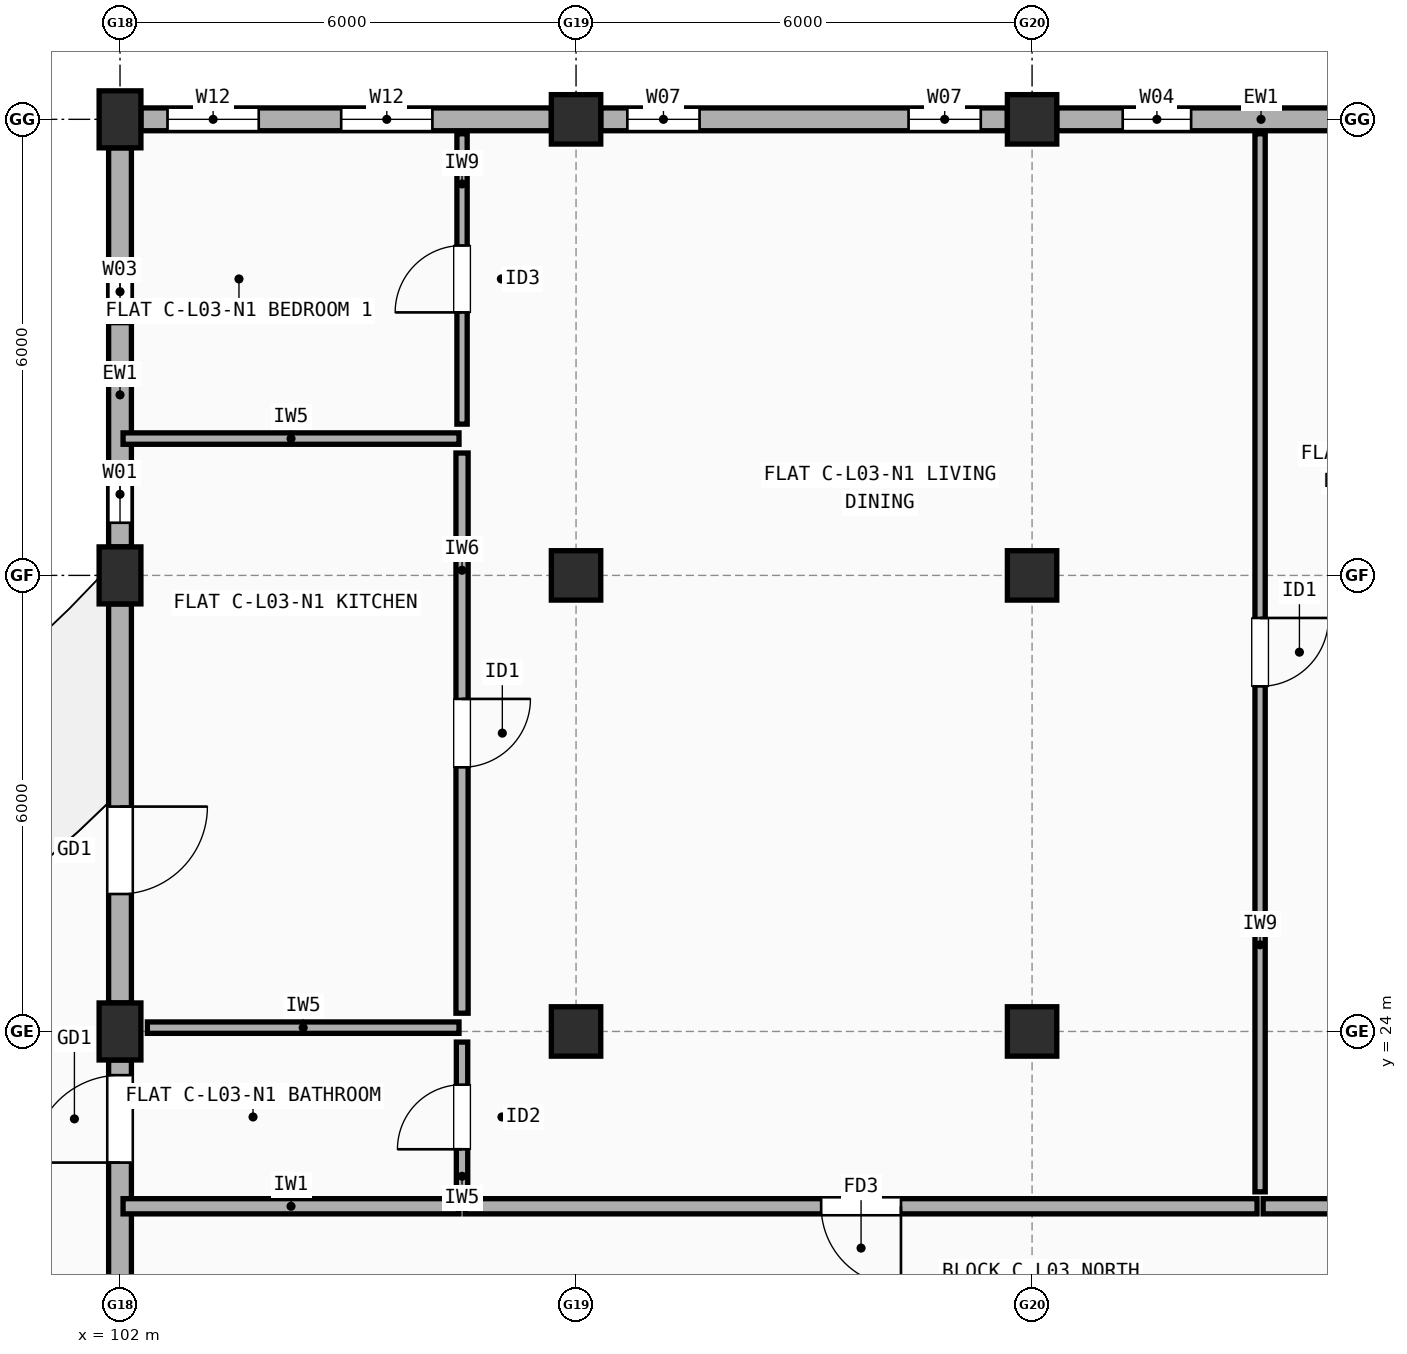
"""IFC4 building model, lengths in metres.
Left out: names, types, materials, properties, quantities, classifications, styles, units other than length and angle.
Written with IfcOpenShell. Run it as: python <this file> out.ifc"""

import sys

from ifc_helpers import new_model, si_unit, direction, frame, frame_2d, origin, origin_2d, place, context, subcontext, project, spatial, rectangle, extrude, element, fill, save


model = new_model("IFC4")
c1 = context("Model", 3, precision=1e-05, world=origin(), true_north=direction((0.0, 1.0)))
c2 = subcontext(c1, "Body", "Model", "MODEL_VIEW")
j1 = project(units=[si_unit("LENGTHUNIT", "METRE"), si_unit("PLANEANGLEUNIT", "RADIAN")], contexts=[c1])
p1 = place(None, origin())
s1 = spatial("IfcSite", under=j1, at=p1, CompositionType="ELEMENT")
p2 = place(p1, origin())
s2 = spatial("IfcBuilding", under=s1, at=p2, CompositionType="ELEMENT")
p3 = place(p2, frame((0.0, 0.0, 10.9)))
s3 = spatial("IfcBuildingStorey", under=s2, at=p3, CompositionType="ELEMENT", Elevation=10.9)
for number, where, z_axis, x_axis in (
    (1, (102.0, 24.0, 0.0), (0.0, 0.0, 1.0), (1.0, 0.0, 0.0)),
    (2, (102.0, 30.0, 0.0), (0.0, 0.0, 1.0), (1.0, 0.0, 0.0)),
    (3, (102.0, 36.0, 0.0), (0.0, 0.0, 1.0), (1.0, 0.0, 0.0)),
):
    element("IfcColumn", number, at=place(p3, frame(where, z_axis=z_axis, x_axis=x_axis)), inside=s3, PredefinedType="COLUMN", context=c2, shape_type="SweptSolid", body=[
        extrude(rectangle(XDim=0.55, YDim=0.75, at=origin_2d()), origin(), (0.0, 0.0, 1.0), 2.96),
    ])
for number, where, z_axis, x_axis in (
    (4, (108.0, 24.0, 0.0), (0.0, 0.0, 1.0), (1.0, 0.0, 0.0)),
    (5, (108.0, 30.0, 0.0), (0.0, 0.0, 1.0), (1.0, 0.0, 0.0)),
    (6, (108.0, 36.0, 0.0), (0.0, 0.0, 1.0), (1.0, 0.0, 0.0)),
    (7, (114.0, 24.0, 0.0), (0.0, 0.0, 1.0), (1.0, 0.0, 0.0)),
    (8, (114.0, 30.0, 0.0), (0.0, 0.0, 1.0), (1.0, 0.0, 0.0)),
    (9, (114.0, 36.0, 0.0), (0.0, 0.0, 1.0), (1.0, 0.0, 0.0)),
):
    element("IfcColumn", number, at=place(p3, frame(where, z_axis=z_axis, x_axis=x_axis)), inside=s3, PredefinedType="COLUMN", context=c2, shape_type="SweptSolid", body=[
        extrude(rectangle(XDim=0.65, YDim=0.65, at=origin_2d()), origin(), (0.0, 0.0, 1.0), 2.96),
    ])
p4 = place(p3, frame((119.675, 36.0, 0.0), z_axis=(0.0, 0.0, 1.0), x_axis=(-1.0, 0.0, 0.0)))
e10 = element("IfcWall", 10, at=p4, inside=s3, PredefinedType="STANDARD", context=c2, shape_type="SweptSolid", body=[
    extrude(rectangle(XDim=5.35, YDim=0.3, at=frame_2d((2.675, 0.0))), origin(), (0.0, 0.0, 1.0), 2.442),
])
p5 = place(p4, frame((0.893, 0.0, 0.9)))
e11 = element("IfcOpeningElement", 11, at=p5, cuts=e10, PredefinedType="OPENING", context=c2, shape_type="SweptSolid", body=[
    extrude(rectangle(XDim=0.85, YDim=1.25, at=frame_2d((0.425, 0.625))), frame((0.0, 0.16, 0.0), z_axis=(0.0, -1.0, 0.0), x_axis=(1.0, 0.0, 0.0)), (0.0, 0.0, 1.0), 0.32),
])
p6 = place(p4, frame((3.583, 0.0, 0.9)))
e12 = element("IfcOpeningElement", 12, at=p6, cuts=e10, PredefinedType="OPENING", context=c2, shape_type="SweptSolid", body=[
    extrude(rectangle(XDim=0.9, YDim=1.3, at=frame_2d((0.45, 0.65))), frame((0.0, 0.16, 0.0), z_axis=(0.0, -1.0, 0.0), x_axis=(1.0, 0.0, 0.0)), (0.0, 0.0, 1.0), 0.32),
])
p7 = place(p3, frame((113.675, 36.0, 0.0), z_axis=(0.0, 0.0, 1.0), x_axis=(-1.0, 0.0, 0.0)))
e13 = element("IfcWall", 13, at=p7, inside=s3, PredefinedType="STANDARD", context=c2, shape_type="SweptSolid", body=[
    extrude(rectangle(XDim=5.35, YDim=0.3, at=frame_2d((2.675, 0.0))), origin(), (0.0, 0.0, 1.0), 2.442),
])
p8 = place(p7, frame((0.35, 0.0, 0.9)))
e14 = element("IfcOpeningElement", 14, at=p8, cuts=e13, PredefinedType="OPENING", context=c2, shape_type="SweptSolid", body=[
    extrude(rectangle(XDim=0.95, YDim=1.35, at=frame_2d((0.475, 0.675))), frame((0.0, 0.16, 0.0), z_axis=(0.0, -1.0, 0.0), x_axis=(1.0, 0.0, 0.0)), (0.0, 0.0, 1.0), 0.32),
])
p9 = place(p7, frame((4.05, 0.0, 0.9)))
e15 = element("IfcOpeningElement", 15, at=p9, cuts=e13, PredefinedType="OPENING", context=c2, shape_type="SweptSolid", body=[
    extrude(rectangle(XDim=0.95, YDim=1.35, at=frame_2d((0.475, 0.675))), frame((0.0, 0.16, 0.0), z_axis=(0.0, -1.0, 0.0), x_axis=(1.0, 0.0, 0.0)), (0.0, 0.0, 1.0), 0.32),
])
p10 = place(p3, frame((107.675, 36.0, 0.0), z_axis=(0.0, 0.0, 1.0), x_axis=(-1.0, 0.0, 0.0)))
e16 = element("IfcWall", 16, at=p10, inside=s3, PredefinedType="STANDARD", context=c2, shape_type="SweptSolid", body=[
    extrude(rectangle(XDim=5.4, YDim=0.3, at=frame_2d((2.7, 0.0))), origin(), (0.0, 0.0, 1.0), 2.442),
])
p11 = place(p10, frame((1.565, 0.0, 0.9)))
e17 = element("IfcOpeningElement", 17, at=p11, cuts=e16, PredefinedType="OPENING", context=c2, shape_type="SweptSolid", body=[
    extrude(rectangle(XDim=1.2, YDim=1.35, at=frame_2d((0.6, 0.675))), frame((0.0, 0.16, 0.0), z_axis=(0.0, -1.0, 0.0), x_axis=(1.0, 0.0, 0.0)), (0.0, 0.0, 1.0), 0.32),
])
p12 = place(p10, frame((3.85, 0.0, 0.9)))
e18 = element("IfcOpeningElement", 18, at=p12, cuts=e16, PredefinedType="OPENING", context=c2, shape_type="SweptSolid", body=[
    extrude(rectangle(XDim=1.2, YDim=1.35, at=frame_2d((0.6, 0.675))), frame((0.0, 0.16, 0.0), z_axis=(0.0, -1.0, 0.0), x_axis=(1.0, 0.0, 0.0)), (0.0, 0.0, 1.0), 0.32),
])
p13 = place(p3, frame((102.0, 35.625, 0.0), z_axis=(0.0, 0.0, 1.0), x_axis=(0.0, -1.0, 0.0)))
e19 = element("IfcWall", 19, at=p13, inside=s3, PredefinedType="STANDARD", context=c2, shape_type="SweptSolid", body=[
    extrude(rectangle(XDim=5.25, YDim=0.3, at=frame_2d((2.625, 0.0))), origin(), (0.0, 0.0, 1.0), 2.442),
])
p14 = place(p13, frame((1.468, 0.0, 0.9)))
e20 = element("IfcOpeningElement", 20, at=p14, cuts=e19, PredefinedType="OPENING", context=c2, shape_type="SweptSolid", body=[
    extrude(rectangle(XDim=0.85, YDim=1.25, at=frame_2d((0.425, 0.625))), frame((0.0, 0.16, 0.0), z_axis=(0.0, -1.0, 0.0), x_axis=(1.0, 0.0, 0.0)), (0.0, 0.0, 1.0), 0.32),
])
p15 = place(p13, frame((4.183, 0.0, 0.9)))
e21 = element("IfcOpeningElement", 21, at=p15, cuts=e19, PredefinedType="OPENING", context=c2, shape_type="SweptSolid", body=[
    extrude(rectangle(XDim=0.75, YDim=1.15, at=frame_2d((0.375, 0.575))), frame((0.0, 0.16, 0.0), z_axis=(0.0, -1.0, 0.0), x_axis=(1.0, 0.0, 0.0)), (0.0, 0.0, 1.0), 0.32),
])
p16 = place(p3, frame((102.0, 29.625, 0.0), z_axis=(0.0, 0.0, 1.0), x_axis=(0.0, -1.0, 0.0)))
e22 = element("IfcWall", 22, at=p16, inside=s3, PredefinedType="STANDARD", context=c2, shape_type="SweptSolid", body=[
    extrude(rectangle(XDim=5.25, YDim=0.3, at=frame_2d((2.625, 0.0))), origin(), (0.0, 0.0, 1.0), 2.442),
])
p17 = place(p16, frame((2.667, 0.0, 0.0)))
e23 = element("IfcOpeningElement", 23, at=p17, cuts=e22, PredefinedType="OPENING", context=c2, shape_type="SweptSolid", body=[
    extrude(rectangle(XDim=1.15, YDim=2.15, at=frame_2d((0.575, 1.075))), frame((0.0, 0.16, 0.0), z_axis=(0.0, -1.0, 0.0), x_axis=(1.0, 0.0, 0.0)), (0.0, 0.0, 1.0), 0.32),
])
p18 = place(p3, frame((102.0, 23.625, 0.0), z_axis=(0.0, 0.0, 1.0), x_axis=(0.0, -1.0, 0.0)))
e24 = element("IfcWall", 24, at=p18, inside=s3, PredefinedType="STANDARD", context=c2, shape_type="SweptSolid", body=[
    extrude(rectangle(XDim=5.25, YDim=0.3, at=frame_2d((2.625, 0.0))), origin(), (0.0, 0.0, 1.0), 2.442),
])
p19 = place(p18, frame((0.2, 0.0, 0.0)))
e25 = element("IfcOpeningElement", 25, at=p19, cuts=e24, PredefinedType="OPENING", context=c2, shape_type="SweptSolid", body=[
    extrude(rectangle(XDim=1.15, YDim=2.15, at=frame_2d((0.575, 1.075))), frame((0.0, 0.16, 0.0), z_axis=(0.0, -1.0, 0.0), x_axis=(1.0, 0.0, 0.0)), (0.0, 0.0, 1.0), 0.32),
])
p20 = place(p18, frame((3.133, 0.0, 0.9)))
e26 = element("IfcOpeningElement", 26, at=p20, cuts=e24, PredefinedType="OPENING", context=c2, shape_type="SweptSolid", body=[
    extrude(rectangle(XDim=0.95, YDim=1.35, at=frame_2d((0.475, 0.675))), frame((0.0, 0.16, 0.0), z_axis=(0.0, -1.0, 0.0), x_axis=(1.0, 0.0, 0.0)), (0.0, 0.0, 1.0), 0.32),
])
p21 = place(p3, frame((102.04, 21.7, 0.0), z_axis=(0.0, 0.0, 1.0), x_axis=(1.0, 0.0, 0.0)))
e27 = element("IfcWall", 27, at=p21, inside=s3, PredefinedType="SOLIDWALL", context=c2, shape_type="SweptSolid", body=[
    extrude(rectangle(XDim=4.42, YDim=0.2, at=frame_2d((2.21, 0.0))), origin(), (0.0, 0.0, 1.0), 2.442),
])
p22 = place(p3, frame((106.54, 21.7, 0.0), z_axis=(0.0, 0.0, 1.0), x_axis=(1.0, 0.0, 0.0)))
e28 = element("IfcWall", 28, at=p22, inside=s3, PredefinedType="SOLIDWALL", context=c2, shape_type="SweptSolid", body=[
    extrude(rectangle(XDim=10.42, YDim=0.2, at=frame_2d((5.21, 0.0))), origin(), (0.0, 0.0, 1.0), 2.508),
])
p23 = place(p22, frame((4.685, 0.0, 0.0)))
e29 = element("IfcOpeningElement", 29, at=p23, cuts=e28, PredefinedType="OPENING", context=c2, shape_type="SweptSolid", body=[
    extrude(rectangle(XDim=1.05, YDim=2.15, at=frame_2d((0.525, 1.075))), frame((0.0, 0.11, 0.0), z_axis=(0.0, -1.0, 0.0), x_axis=(1.0, 0.0, 0.0)), (0.0, 0.0, 1.0), 0.22),
])
p24 = place(p3, frame((106.5, 31.99, 0.0), z_axis=(0.0, 0.0, 1.0), x_axis=(0.0, 1.0, 0.0)))
e30 = element("IfcWall", 30, at=p24, inside=s3, PredefinedType="PARTITIONING", context=c2, shape_type="SweptSolid", body=[
    extrude(rectangle(XDim=3.82, YDim=0.135, at=frame_2d((1.91, 0.0))), origin(), (0.0, 0.0, 1.0), 2.96),
])
p25 = place(p24, frame((1.47, 0.0, 0.0)))
e31 = element("IfcOpeningElement", 31, at=p25, cuts=e30, PredefinedType="OPENING", context=c2, shape_type="SweptSolid", body=[
    extrude(rectangle(XDim=0.88, YDim=2.1, at=frame_2d((0.44, 1.05))), frame((0.0, 0.077, 0.0), z_axis=(0.0, -1.0, 0.0), x_axis=(1.0, 0.0, 0.0)), (0.0, 0.0, 1.0), 0.155),
])
p26 = place(p3, frame((106.5, 24.24, 0.0), z_axis=(0.0, 0.0, 1.0), x_axis=(0.0, 1.0, 0.0)))
e32 = element("IfcWall", 32, at=p26, inside=s3, PredefinedType="PLUMBINGWALL", context=c2, shape_type="SweptSolid", body=[
    extrude(rectangle(XDim=7.37, YDim=0.16, at=frame_2d((3.685, 0.0))), origin(), (0.0, 0.0, 1.0), 2.442),
])
p27 = place(p26, frame((3.235, 0.0, 0.0)))
e33 = element("IfcOpeningElement", 33, at=p27, cuts=e32, PredefinedType="OPENING", context=c2, shape_type="SweptSolid", body=[
    extrude(rectangle(XDim=0.9, YDim=2.1, at=frame_2d((0.45, 1.05))), frame((0.0, 0.09, 0.0), z_axis=(0.0, -1.0, 0.0), x_axis=(1.0, 0.0, 0.0)), (0.0, 0.0, 1.0), 0.18),
])
p28 = place(p3, frame((106.5, 21.89, 0.0), z_axis=(0.0, 0.0, 1.0), x_axis=(0.0, 1.0, 0.0)))
e34 = element("IfcWall", 34, at=p28, inside=s3, PredefinedType="PARTITIONING", context=c2, shape_type="SweptSolid", body=[
    extrude(rectangle(XDim=1.97, YDim=0.15, at=frame_2d((0.985, 0.0))), origin(), (0.0, 0.0, 1.0), 2.96),
])
p29 = place(p28, frame((0.56, 0.0, 0.0)))
e35 = element("IfcOpeningElement", 35, at=p29, cuts=e34, PredefinedType="OPENING", context=c2, shape_type="SweptSolid", body=[
    extrude(rectangle(XDim=0.85, YDim=2.1, at=frame_2d((0.425, 1.05))), frame((0.0, 0.085, 0.0), z_axis=(0.0, -1.0, 0.0), x_axis=(1.0, 0.0, 0.0)), (0.0, 0.0, 1.0), 0.17),
])
p30 = place(p3, frame((102.04, 31.8, 0.0), z_axis=(0.0, 0.0, 1.0), x_axis=(1.0, 0.0, 0.0)))
e36 = element("IfcWall", 36, at=p30, inside=s3, PredefinedType="PARTITIONING", context=c2, shape_type="SweptSolid", body=[
    extrude(rectangle(XDim=4.42, YDim=0.15, at=frame_2d((2.21, 0.0))), origin(), (0.0, 0.0, 1.0), 2.442),
])
p31 = place(p3, frame((102.36, 24.05, 0.0), z_axis=(0.0, 0.0, 1.0), x_axis=(1.0, 0.0, 0.0)))
e37 = element("IfcWall", 37, at=p31, inside=s3, PredefinedType="PARTITIONING", context=c2, shape_type="SweptSolid", body=[
    extrude(rectangle(XDim=4.1, YDim=0.15, at=frame_2d((2.05, 0.0))), origin(), (0.0, 0.0, 1.0), 2.508),
])
p32 = place(p3, frame((117.04, 21.7, 0.0), z_axis=(0.0, 0.0, 1.0), x_axis=(1.0, 0.0, 0.0)))
e38 = element("IfcWall", 38, at=p32, inside=s3, PredefinedType="SOLIDWALL", context=c2, shape_type="SweptSolid", body=[
    extrude(rectangle(XDim=2.92, YDim=0.2, at=frame_2d((1.46, 0.0))), origin(), (0.0, 0.0, 1.0), 2.96),
])
p33 = place(p3, frame((117.0, 21.89, 0.0), z_axis=(0.0, 0.0, 1.0), x_axis=(0.0, 1.0, 0.0)))
e39 = element("IfcWall", 39, at=p33, inside=s3, PredefinedType="PARTITIONING", context=c2, shape_type="SweptSolid", body=[
    extrude(rectangle(XDim=13.92, YDim=0.135, at=frame_2d((6.96, 0.0))), origin(), (0.0, 0.0, 1.0), 2.442),
])
p34 = place(p33, frame((6.65, 0.0, 0.0)))
e40 = element("IfcOpeningElement", 40, at=p34, cuts=e39, PredefinedType="OPENING", context=c2, shape_type="SweptSolid", body=[
    extrude(rectangle(XDim=0.9, YDim=2.1, at=frame_2d((0.45, 1.05))), frame((0.0, 0.077, 0.0), z_axis=(0.0, -1.0, 0.0), x_axis=(1.0, 0.0, 0.0)), (0.0, 0.0, 1.0), 0.155),
])
p35 = place(p6, origin())
e41 = element("IfcWindow", 41, at=p35, inside=s3, PartitioningType="SINGLE_PANEL", PredefinedType="WINDOW", context=c2, shape_type="SweptSolid", body=[
    extrude(rectangle(XDim=0.9, YDim=1.3, at=frame_2d((0.45, 0.65))), frame((0.0, 0.03, 0.0), z_axis=(0.0, -1.0, 0.0), x_axis=(1.0, 0.0, 0.0)), (0.0, 0.0, 1.0), 0.06),
])
fill(e12, e41)
p36 = place(p8, origin())
e42 = element("IfcWindow", 42, at=p36, inside=s3, PartitioningType="SINGLE_PANEL", PredefinedType="WINDOW", context=c2, shape_type="SweptSolid", body=[
    extrude(rectangle(XDim=0.95, YDim=1.35, at=frame_2d((0.475, 0.675))), frame((0.0, 0.03, 0.0), z_axis=(0.0, -1.0, 0.0), x_axis=(1.0, 0.0, 0.0)), (0.0, 0.0, 1.0), 0.06),
])
fill(e14, e42)
p37 = place(p9, origin())
e43 = element("IfcWindow", 43, at=p37, inside=s3, PartitioningType="SINGLE_PANEL", PredefinedType="WINDOW", context=c2, shape_type="SweptSolid", body=[
    extrude(rectangle(XDim=0.95, YDim=1.35, at=frame_2d((0.475, 0.675))), frame((0.0, 0.03, 0.0), z_axis=(0.0, -1.0, 0.0), x_axis=(1.0, 0.0, 0.0)), (0.0, 0.0, 1.0), 0.06),
])
fill(e15, e43)
p38 = place(p11, origin())
e44 = element("IfcWindow", 44, at=p38, inside=s3, PartitioningType="SINGLE_PANEL", PredefinedType="WINDOW", context=c2, shape_type="SweptSolid", body=[
    extrude(rectangle(XDim=1.2, YDim=1.35, at=frame_2d((0.6, 0.675))), frame((0.0, 0.03, 0.0), z_axis=(0.0, -1.0, 0.0), x_axis=(1.0, 0.0, 0.0)), (0.0, 0.0, 1.0), 0.06),
])
fill(e17, e44)
p39 = place(p12, origin())
e45 = element("IfcWindow", 45, at=p39, inside=s3, PartitioningType="SINGLE_PANEL", PredefinedType="WINDOW", context=c2, shape_type="SweptSolid", body=[
    extrude(rectangle(XDim=1.2, YDim=1.35, at=frame_2d((0.6, 0.675))), frame((0.0, 0.03, 0.0), z_axis=(0.0, -1.0, 0.0), x_axis=(1.0, 0.0, 0.0)), (0.0, 0.0, 1.0), 0.06),
])
fill(e18, e45)
p40 = place(p14, origin())
e46 = element("IfcWindow", 46, at=p40, inside=s3, PartitioningType="SINGLE_PANEL", PredefinedType="WINDOW", context=c2, shape_type="SweptSolid", body=[
    extrude(rectangle(XDim=0.85, YDim=1.25, at=frame_2d((0.425, 0.625))), frame((0.0, 0.03, 0.0), z_axis=(0.0, -1.0, 0.0), x_axis=(1.0, 0.0, 0.0)), (0.0, 0.0, 1.0), 0.06),
])
fill(e20, e46)
p41 = place(p15, origin())
e47 = element("IfcWindow", 47, at=p41, inside=s3, PartitioningType="SINGLE_PANEL", PredefinedType="WINDOW", context=c2, shape_type="SweptSolid", body=[
    extrude(rectangle(XDim=0.75, YDim=1.15, at=frame_2d((0.375, 0.575))), frame((0.0, 0.03, 0.0), z_axis=(0.0, -1.0, 0.0), x_axis=(1.0, 0.0, 0.0)), (0.0, 0.0, 1.0), 0.06),
])
fill(e21, e47)
p42 = place(p17, frame((1.15, 0.0, 0.0), z_axis=(0.0, 0.0, 1.0), x_axis=(-1.0, 0.0, 0.0)))
e48 = element("IfcDoor", 48, at=p42, inside=s3, OperationType="SINGLE_SWING_LEFT", PredefinedType="DOOR", context=c2, shape_type="SweptSolid", body=[
    extrude(rectangle(XDim=1.15, YDim=2.15, at=frame_2d((0.575, 1.075))), frame((0.0, 0.025, 0.0), z_axis=(0.0, -1.0, 0.0), x_axis=(1.0, 0.0, 0.0)), (0.0, 0.0, 1.0), 0.05),
])
fill(e23, e48)
p43 = place(p19, frame((1.15, 0.0, 0.0), z_axis=(0.0, 0.0, 1.0), x_axis=(-1.0, 0.0, 0.0)))
e49 = element("IfcDoor", 49, at=p43, inside=s3, OperationType="SINGLE_SWING_RIGHT", PredefinedType="DOOR", context=c2, shape_type="SweptSolid", body=[
    extrude(rectangle(XDim=1.15, YDim=2.15, at=frame_2d((0.575, 1.075))), frame((0.0, 0.025, 0.0), z_axis=(0.0, -1.0, 0.0), x_axis=(1.0, 0.0, 0.0)), (0.0, 0.0, 1.0), 0.05),
])
fill(e25, e49)
p44 = place(p23, origin())
e50 = element("IfcDoor", 50, at=p44, inside=s3, OperationType="SINGLE_SWING_RIGHT", PredefinedType="DOOR", context=c2, shape_type="SweptSolid", body=[
    extrude(rectangle(XDim=1.05, YDim=2.15, at=frame_2d((0.525, 1.075))), frame((0.0, 0.025, 0.0), z_axis=(0.0, -1.0, 0.0), x_axis=(1.0, 0.0, 0.0)), (0.0, 0.0, 1.0), 0.05),
])
fill(e29, e50)
p45 = place(p25, origin())
e51 = element("IfcDoor", 51, at=p45, inside=s3, OperationType="SINGLE_SWING_LEFT", PredefinedType="DOOR", context=c2, shape_type="SweptSolid", body=[
    extrude(rectangle(XDim=0.88, YDim=2.1, at=frame_2d((0.44, 1.05))), frame((0.0, 0.025, 0.0), z_axis=(0.0, -1.0, 0.0), x_axis=(1.0, 0.0, 0.0)), (0.0, 0.0, 1.0), 0.05),
])
fill(e31, e51)
p46 = place(p27, origin())
e52 = element("IfcDoor", 52, at=p46, inside=s3, OperationType="SINGLE_SWING_RIGHT", PredefinedType="DOOR", context=c2, shape_type="SweptSolid", body=[
    extrude(rectangle(XDim=0.9, YDim=2.1, at=frame_2d((0.45, 1.05))), frame((0.0, 0.025, 0.0), z_axis=(0.0, -1.0, 0.0), x_axis=(1.0, 0.0, 0.0)), (0.0, 0.0, 1.0), 0.05),
])
fill(e33, e52)
p47 = place(p29, origin())
e53 = element("IfcDoor", 53, at=p47, inside=s3, OperationType="SINGLE_SWING_LEFT", PredefinedType="DOOR", context=c2, shape_type="SweptSolid", body=[
    extrude(rectangle(XDim=0.85, YDim=2.1, at=frame_2d((0.425, 1.05))), frame((0.0, 0.025, 0.0), z_axis=(0.0, -1.0, 0.0), x_axis=(1.0, 0.0, 0.0)), (0.0, 0.0, 1.0), 0.05),
])
fill(e35, e53)
p48 = place(p34, origin())
e54 = element("IfcDoor", 54, at=p48, inside=s3, OperationType="SINGLE_SWING_RIGHT", PredefinedType="DOOR", context=c2, shape_type="SweptSolid", body=[
    extrude(rectangle(XDim=0.9, YDim=2.1, at=frame_2d((0.45, 1.05))), frame((0.0, 0.025, 0.0), z_axis=(0.0, -1.0, 0.0), x_axis=(1.0, 0.0, 0.0)), (0.0, 0.0, 1.0), 0.05),
])
fill(e40, e54)
save(model, sys.argv[1])
